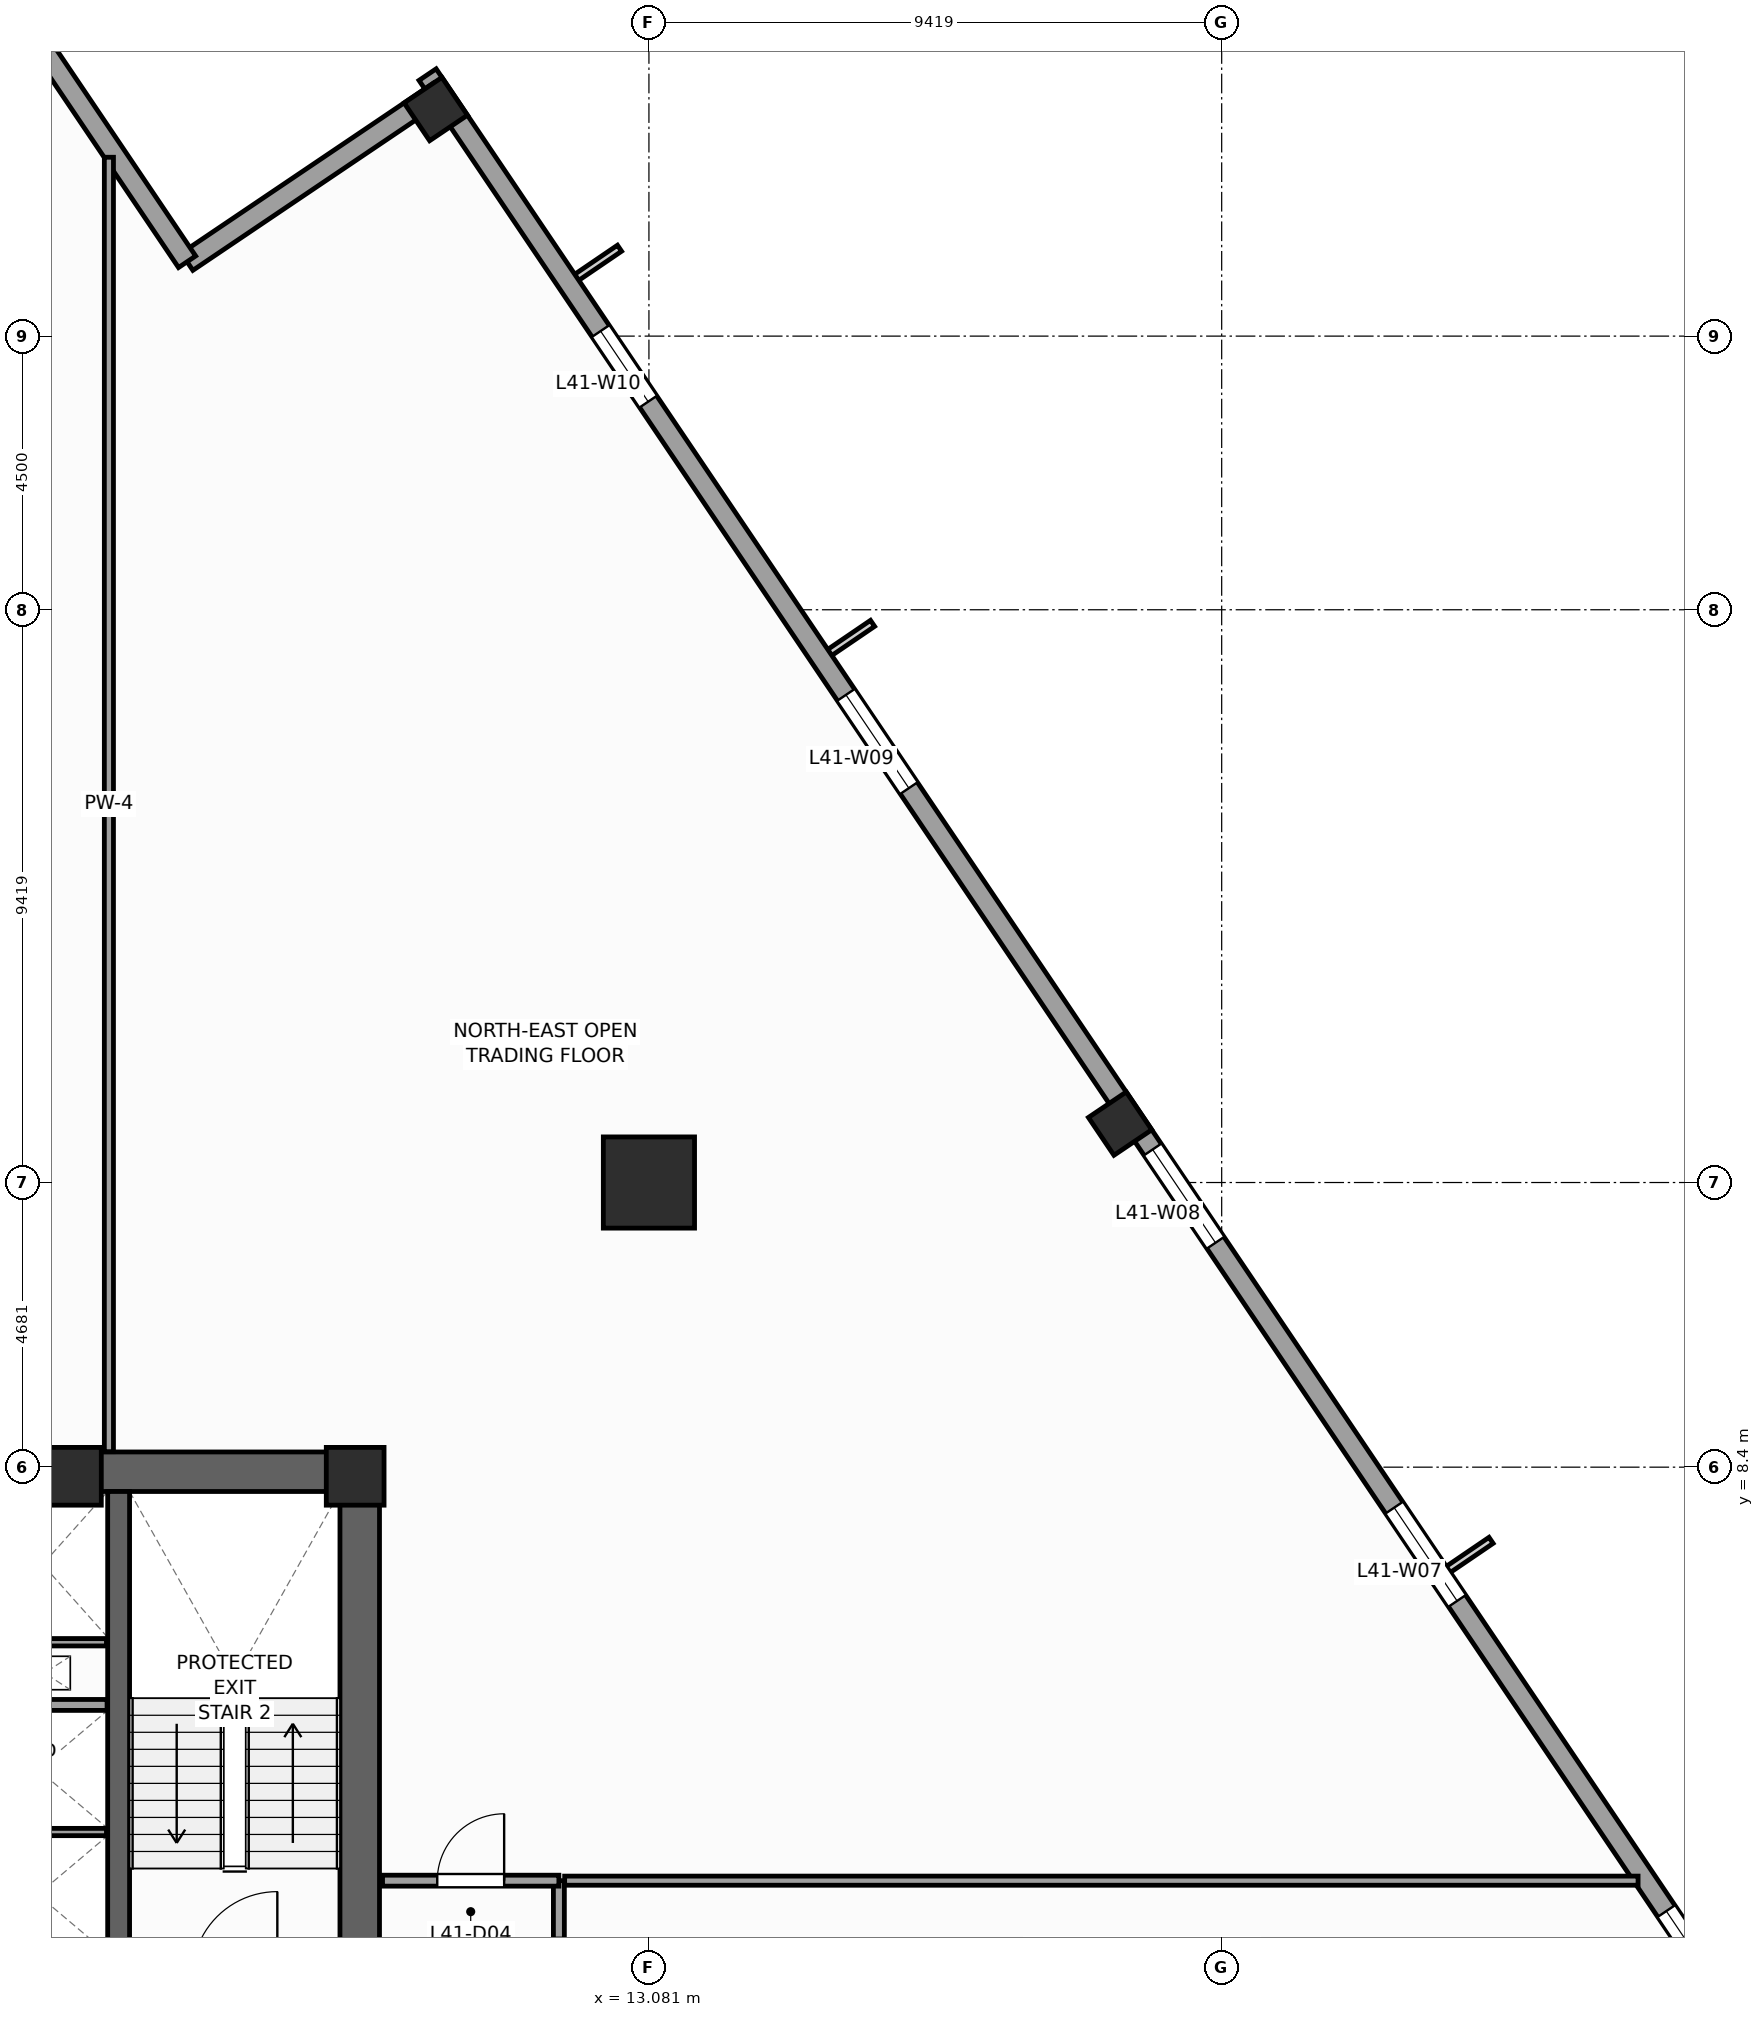
"""IFC4 building model, lengths in metres.
Left out: names, types, materials, properties, quantities, classifications, styles, units other than length and angle.
Written with IfcOpenShell. Run it as: python <this file> out.ifc"""

import sys

from ifc_helpers import new_model, si_unit, direction, frame, frame_2d, origin, origin_2d, place, context, subcontext, project, spatial, rectangle, extrude, source, transform, mapped, element, fill, save


model = new_model("IFC4")
c1 = context("Model", 3, precision=1e-05, world=origin(), true_north=direction((0.0, 1.0)))
c2 = subcontext(c1, "Body", "Model", "MODEL_VIEW")
j1 = project(units=[si_unit("LENGTHUNIT", "METRE"), si_unit("PLANEANGLEUNIT", "RADIAN")], contexts=[c1])
p1 = place(None, origin())
s1 = spatial("IfcSite", under=j1, at=p1, CompositionType="ELEMENT")
p2 = place(p1, origin())
s2 = spatial("IfcBuilding", under=s1, at=p2, CompositionType="ELEMENT")
p3 = place(p2, frame((0.0, 0.0, 172.4)))
s3 = spatial("IfcBuildingStorey", under=s2, at=p3, CompositionType="ELEMENT", Elevation=172.4)
p4 = place(p3, frame((-8.65, 8.325, 0.0), z_axis=(0.0, 0.0, 1.0), x_axis=(1.0, 0.0, 0.0)))
e1 = element("IfcWall", 1, at=p4, inside=s3, PredefinedType="SHEAR", context=c2, shape_type="SweptSolid", body=[
    extrude(rectangle(XDim=17.3, YDim=0.65, at=frame_2d((8.65, 0.0))), origin(), (0.0, 0.0, 1.0), 4.0),
])
p5 = place(p3, frame((8.325, -8.0, 0.0), z_axis=(0.0, 0.0, 1.0), x_axis=(0.0, 1.0, 0.0)))
e2 = element("IfcWall", 2, at=p5, inside=s3, PredefinedType="SHEAR", context=c2, shape_type="SweptSolid", body=[
    extrude(rectangle(XDim=16.0, YDim=0.65, at=frame_2d((8.0, 0.0))), origin(), (0.0, 0.0, 1.0), 4.0),
])
p6 = place(p5, frame((4.69, 0.0, 0.0)))
e3 = element("IfcOpeningElement", 3, at=p6, cuts=e2, PredefinedType="OPENING", context=c2, shape_type="SweptSolid", body=[
    extrude(rectangle(XDim=1.3, YDim=2.2, at=frame_2d((0.65, 1.1))), frame((0.0, 0.335, 0.0), z_axis=(0.0, -1.0, 0.0), x_axis=(1.0, 0.0, 0.0)), (0.0, 0.0, 1.0), 0.67),
])
p7 = place(p3, frame((4.36, -8.0, 0.0), z_axis=(0.0, 0.0, 1.0), x_axis=(0.0, 1.0, 0.0)))
e4 = element("IfcWall", 4, at=p7, inside=s3, PredefinedType="SHEAR", context=c2, shape_type="SweptSolid", body=[
    extrude(rectangle(XDim=16.0, YDim=0.36, at=frame_2d((8.0, 0.0))), origin(), (0.0, 0.0, 1.0), 4.0),
])
m1 = source(origin(), c2, "Body", "SweptSolid", [
    extrude(rectangle(XDim=0.95, YDim=0.95, at=origin_2d()), origin(), (0.0, 0.0, 1.0), 4.0),
])
for number, where, z_axis, x_axis in (
    (5, (8.25, 8.25, 0.0), (0.0, 0.0, 1.0), (1.0, 0.0, 0.0)),
    (6, (3.6, 8.25, 0.0), (0.0, 0.0, 1.0), (1.0, 0.0, 0.0)),
):
    element("IfcColumn", number, at=place(p3, frame(where, z_axis=z_axis, x_axis=x_axis)), inside=s3, PredefinedType="PILASTER", context=c2, shape_type="MappedRepresentation", body=[
        mapped(m1, transform((0.0, 0.0, 0.0), scale=1.0)),
    ])
m2 = source(origin(), c2, "Body", "SweptSolid", [
    extrude(rectangle(XDim=1.5, YDim=1.5, at=origin_2d()), origin(), (0.0, 0.0, 1.0), 4.0),
])
p8 = place(p3, frame((13.081, 13.081, 0.0), z_axis=(0.0, 0.0, 1.0), x_axis=(1.0, 0.0, 0.0)))
e7 = element("IfcColumn", 7, at=p8, inside=s3, PredefinedType="COLUMN", context=c2, shape_type="MappedRepresentation", body=[
    mapped(m2, transform((0.0, 0.0, 0.0), scale=1.0)),
])
m3 = source(origin(), c2, "Body", "SweptSolid", [
    extrude(rectangle(XDim=0.75, YDim=0.75, at=origin_2d()), origin(), (0.0, 0.0, 1.0), 4.0),
])
for number, where, z_axis, x_axis in (
    (8, (20.83, 14.05, 0.0), (0.0, 0.0, 1.0), (0.829, 0.559, 0.0)),
    (9, (9.576, 30.734, 0.0), (0.0, 0.0, 1.0), (0.829, 0.559, 0.0)),
):
    element("IfcColumn", number, at=place(p3, frame(where, z_axis=z_axis, x_axis=x_axis)), inside=s3, PredefinedType="COLUMN", context=c2, shape_type="MappedRepresentation", body=[
        mapped(m3, transform((0.0, 0.0, 0.0), scale=1.0)),
    ])
p9 = place(p3, frame((32.558, -2.972, 0.0), z_axis=(0.0, 0.0, 1.0), x_axis=(-0.559194910251, 0.829036218961, 0.0)))
e10 = element("IfcWall", 10, at=p9, inside=s3, PredefinedType="STANDARD", context=c2, shape_type="SweptSolid", body=[
    extrude(rectangle(XDim=41.34, YDim=0.34, at=frame_2d((20.67, 0.0))), origin(), (0.0, 0.0, 1.0), 3.04),
])
p10 = place(p9, frame((3.511, 0.0, 0.56)))
e11 = element("IfcOpeningElement", 11, at=p10, cuts=e10, PredefinedType="OPENING", context=c2, shape_type="SweptSolid", body=[
    extrude(rectangle(XDim=1.4, YDim=2.4, at=frame_2d((0.7, 1.2))), frame((0.0, 0.18, 0.0), z_axis=(0.0, -1.0, 0.0), x_axis=(1.0, 0.0, 0.0)), (0.0, 0.0, 1.0), 0.36),
])
p11 = place(p9, frame((11.064, 0.0, 0.61)))
e12 = element("IfcOpeningElement", 12, at=p11, cuts=e10, PredefinedType="OPENING", context=c2, shape_type="SweptSolid", body=[
    extrude(rectangle(XDim=1.85, YDim=2.35, at=frame_2d((0.925, 1.175))), frame((0.0, 0.18, 0.0), z_axis=(0.0, -1.0, 0.0), x_axis=(1.0, 0.0, 0.0)), (0.0, 0.0, 1.0), 0.36),
])
p12 = place(p9, frame((18.168, 0.0, 0.61)))
e13 = element("IfcOpeningElement", 13, at=p12, cuts=e10, PredefinedType="OPENING", context=c2, shape_type="SweptSolid", body=[
    extrude(rectangle(XDim=1.85, YDim=2.35, at=frame_2d((0.925, 1.175))), frame((0.0, 0.18, 0.0), z_axis=(0.0, -1.0, 0.0), x_axis=(1.0, 0.0, 0.0)), (0.0, 0.0, 1.0), 0.36),
])
p13 = place(p9, frame((27.186, 0.0, 0.61)))
e14 = element("IfcOpeningElement", 14, at=p13, cuts=e10, PredefinedType="OPENING", context=c2, shape_type="SweptSolid", body=[
    extrude(rectangle(XDim=1.85, YDim=2.35, at=frame_2d((0.925, 1.175))), frame((0.0, 0.18, 0.0), z_axis=(0.0, -1.0, 0.0), x_axis=(1.0, 0.0, 0.0)), (0.0, 0.0, 1.0), 0.36),
])
p14 = place(p9, frame((34.852, 0.0, 0.56)))
e15 = element("IfcOpeningElement", 15, at=p14, cuts=e10, PredefinedType="OPENING", context=c2, shape_type="SweptSolid", body=[
    extrude(rectangle(XDim=1.4, YDim=2.4, at=frame_2d((0.7, 1.2))), frame((0.0, 0.18, 0.0), z_axis=(0.0, -1.0, 0.0), x_axis=(1.0, 0.0, 0.0)), (0.0, 0.0, 1.0), 0.36),
])
p15 = place(p3, frame((9.631, 31.019, 0.0), z_axis=(0.0, 0.0, 1.0), x_axis=(-0.829025804298, -0.559210350234, 0.0)))
e16 = element("IfcWall", 16, at=p15, inside=s3, PredefinedType="STANDARD", context=c2, shape_type="SweptSolid", body=[
    extrude(rectangle(XDim=5.0, YDim=0.34, at=frame_2d((2.5, 0.0))), origin(), (0.0, 0.0, 1.0), 3.74),
])
p16 = place(p3, frame((5.486, 28.223, 0.0), z_axis=(0.0, 0.0, 1.0), x_axis=(-0.559171107879, 0.82905227345, 0.0)))
e17 = element("IfcWall", 17, at=p16, inside=s3, PredefinedType="STANDARD", context=c2, shape_type="SweptSolid", body=[
    extrude(rectangle(XDim=5.17, YDim=0.34, at=frame_2d((2.585, 0.0))), origin(), (0.0, 0.0, 1.0), 3.04),
])
p17 = place(p3, frame((1.89, 4.49, 0.0), z_axis=(0.0, 0.0, 1.0), x_axis=(1.0, 0.0, 0.0)))
e18 = element("IfcWall", 18, at=p17, inside=s3, PredefinedType="PARTITIONING", context=c2, shape_type="SweptSolid", body=[
    extrude(rectangle(XDim=2.28, YDim=0.18, at=frame_2d((1.14, 0.0))), origin(), (0.0, 0.0, 1.0), 3.74),
])
p18 = place(p3, frame((1.9, 2.4, 0.0), z_axis=(0.0, 0.0, 1.0), x_axis=(1.0, 0.0, 0.0)))
e19 = element("IfcWall", 19, at=p18, inside=s3, PredefinedType="PARTITIONING", context=c2, shape_type="SweptSolid", body=[
    extrude(rectangle(XDim=2.26, YDim=0.12, at=frame_2d((1.13, 0.0))), origin(), (0.0, 0.0, 1.0), 3.74),
])
p19 = place(p3, frame((2.06, 5.52, 0.0), z_axis=(0.0, 0.0, 1.0), x_axis=(1.0, 0.0, 0.0)))
e20 = element("IfcWall", 20, at=p19, inside=s3, PredefinedType="PARTITIONING", context=c2, shape_type="SweptSolid", body=[
    extrude(rectangle(XDim=2.1, YDim=0.12, at=frame_2d((1.05, 0.0))), origin(), (0.0, 0.0, 1.0), 3.74),
])
p20 = place(p3, frame((11.6, -10.35, 0.0), z_axis=(0.0, 0.0, 1.0), x_axis=(0.0, 1.0, 0.0)))
e21 = element("IfcWall", 21, at=p20, inside=s3, PredefinedType="PARTITIONING", context=c2, shape_type="SweptSolid", body=[
    extrude(rectangle(XDim=11.95, YDim=0.18, at=frame_2d((5.975, 0.0))), origin(), (0.0, 0.0, 1.0), 3.74),
])
p21 = place(p20, frame((9.911, 0.0, 0.0)))
e22 = element("IfcOpeningElement", 22, at=p21, cuts=e21, PredefinedType="OPENING", context=c2, shape_type="SweptSolid", body=[
    extrude(rectangle(XDim=1.1, YDim=2.2, at=frame_2d((0.55, 1.1))), frame((0.0, 0.1, 0.0), z_axis=(0.0, -1.0, 0.0), x_axis=(1.0, 0.0, 0.0)), (0.0, 0.0, 1.0), 0.2),
])
p22 = place(p20, frame((4.1, 0.0, 0.0)))
e23 = element("IfcOpeningElement", 23, at=p22, cuts=e21, PredefinedType="OPENING", context=c2, shape_type="SweptSolid", body=[
    extrude(rectangle(XDim=1.1, YDim=2.2, at=frame_2d((0.55, 1.1))), frame((0.0, 0.1, 0.0), z_axis=(0.0, -1.0, 0.0), x_axis=(1.0, 0.0, 0.0)), (0.0, 0.0, 1.0), 0.2),
])
p23 = place(p20, frame((7.675, 0.0, 0.0)))
e24 = element("IfcOpeningElement", 24, at=p23, cuts=e21, PredefinedType="OPENING", context=c2, shape_type="SweptSolid", body=[
    extrude(rectangle(XDim=1.1, YDim=2.2, at=frame_2d((0.55, 1.1))), frame((0.0, 0.1, 0.0), z_axis=(0.0, -1.0, 0.0), x_axis=(1.0, 0.0, 0.0)), (0.0, 0.0, 1.0), 0.2),
])
p24 = place(p3, frame((8.7, 1.6, 0.0), z_axis=(0.0, 0.0, 1.0), x_axis=(1.0, 0.0, 0.0)))
e25 = element("IfcWall", 25, at=p24, inside=s3, PredefinedType="PARTITIONING", context=c2, shape_type="SweptSolid", body=[
    extrude(rectangle(XDim=2.9, YDim=0.18, at=frame_2d((1.45, 0.0))), origin(), (0.0, 0.0, 1.0), 3.74),
])
p25 = place(p24, frame((0.9, 0.0, 0.0)))
e26 = element("IfcOpeningElement", 26, at=p25, cuts=e25, PredefinedType="OPENING", context=c2, shape_type="SweptSolid", body=[
    extrude(rectangle(XDim=1.1, YDim=2.2, at=frame_2d((0.55, 1.1))), frame((0.0, 0.1, 0.0), z_axis=(0.0, -1.0, 0.0), x_axis=(1.0, 0.0, 0.0)), (0.0, 0.0, 1.0), 0.2),
])
p26 = place(p3, frame((4.2, 8.655, 0.0), z_axis=(0.0, 0.0, 1.0), x_axis=(0.0, 1.0, 0.0)))
e27 = element("IfcWall", 27, at=p26, inside=s3, PredefinedType="PARTITIONING", context=c2, shape_type="SweptSolid", body=[
    extrude(rectangle(XDim=21.286, YDim=0.15, at=frame_2d((10.643, 0.0))), origin(), (0.0, 0.0, 1.0), 3.74),
])
p27 = place(p3, frame((11.695, 1.6, 0.0), z_axis=(0.0, 0.0, 1.0), x_axis=(1.0, 0.0, 0.0)))
e28 = element("IfcWall", 28, at=p27, inside=s3, PredefinedType="PARTITIONING", context=c2, shape_type="SweptSolid", body=[
    extrude(rectangle(XDim=17.653, YDim=0.15, at=frame_2d((8.826, 0.0))), origin(), (0.0, 0.0, 1.0), 3.74),
])
m4 = source(origin(), c2, "Body", "SweptSolid", [
    extrude(rectangle(XDim=1.4, YDim=2.4, at=frame_2d((0.7, 1.2))), frame((0.0, 0.03, 0.0), z_axis=(0.0, -1.0, 0.0), x_axis=(1.0, 0.0, 0.0)), (0.0, 0.0, 1.0), 0.06),
])
p28 = place(p10, origin())
e29 = element("IfcWindow", 29, at=p28, inside=s3, PartitioningType="SINGLE_PANEL", PredefinedType="WINDOW", context=c2, shape_type="MappedRepresentation", body=[
    mapped(m4, transform((0.0, 0.0, 0.0), scale=1.0)),
])
fill(e11, e29)
m5 = source(origin(), c2, "Body", "SweptSolid", [
    extrude(rectangle(XDim=1.85, YDim=2.35, at=frame_2d((0.925, 1.175))), frame((0.0, 0.03, 0.0), z_axis=(0.0, -1.0, 0.0), x_axis=(1.0, 0.0, 0.0)), (0.0, 0.0, 1.0), 0.06),
])
p29 = place(p11, origin())
e30 = element("IfcWindow", 30, at=p29, inside=s3, PartitioningType="SINGLE_PANEL", PredefinedType="WINDOW", context=c2, shape_type="MappedRepresentation", body=[
    mapped(m5, transform((0.0, 0.0, 0.0), scale=1.0)),
])
fill(e12, e30)
p30 = place(p12, origin())
e31 = element("IfcWindow", 31, at=p30, inside=s3, PartitioningType="SINGLE_PANEL", PredefinedType="WINDOW", context=c2, shape_type="MappedRepresentation", body=[
    mapped(m5, transform((0.0, 0.0, 0.0), scale=1.0)),
])
fill(e13, e31)
p31 = place(p13, origin())
e32 = element("IfcWindow", 32, at=p31, inside=s3, PartitioningType="SINGLE_PANEL", PredefinedType="WINDOW", context=c2, shape_type="MappedRepresentation", body=[
    mapped(m5, transform((0.0, 0.0, 0.0), scale=1.0)),
])
fill(e14, e32)
p32 = place(p14, origin())
e33 = element("IfcWindow", 33, at=p32, inside=s3, PartitioningType="SINGLE_PANEL", PredefinedType="WINDOW", context=c2, shape_type="MappedRepresentation", body=[
    mapped(m4, transform((0.0, 0.0, 0.0), scale=1.0)),
])
fill(e15, e33)
m6 = source(origin(), c2, "Body", "SweptSolid", [
    extrude(rectangle(XDim=1.1, YDim=2.2, at=frame_2d((0.55, 1.1))), frame((0.0, 0.025, 0.0), z_axis=(0.0, -1.0, 0.0), x_axis=(1.0, 0.0, 0.0)), (0.0, 0.0, 1.0), 0.05),
])
p33 = place(p25, origin())
e34 = element("IfcDoor", 34, at=p33, inside=s3, OperationType="SINGLE_SWING_RIGHT", PredefinedType="DOOR", context=c2, shape_type="MappedRepresentation", body=[
    mapped(m6, transform((0.0, 0.0, 0.0), scale=1.0)),
])
fill(e26, e34)
save(model, sys.argv[1])
